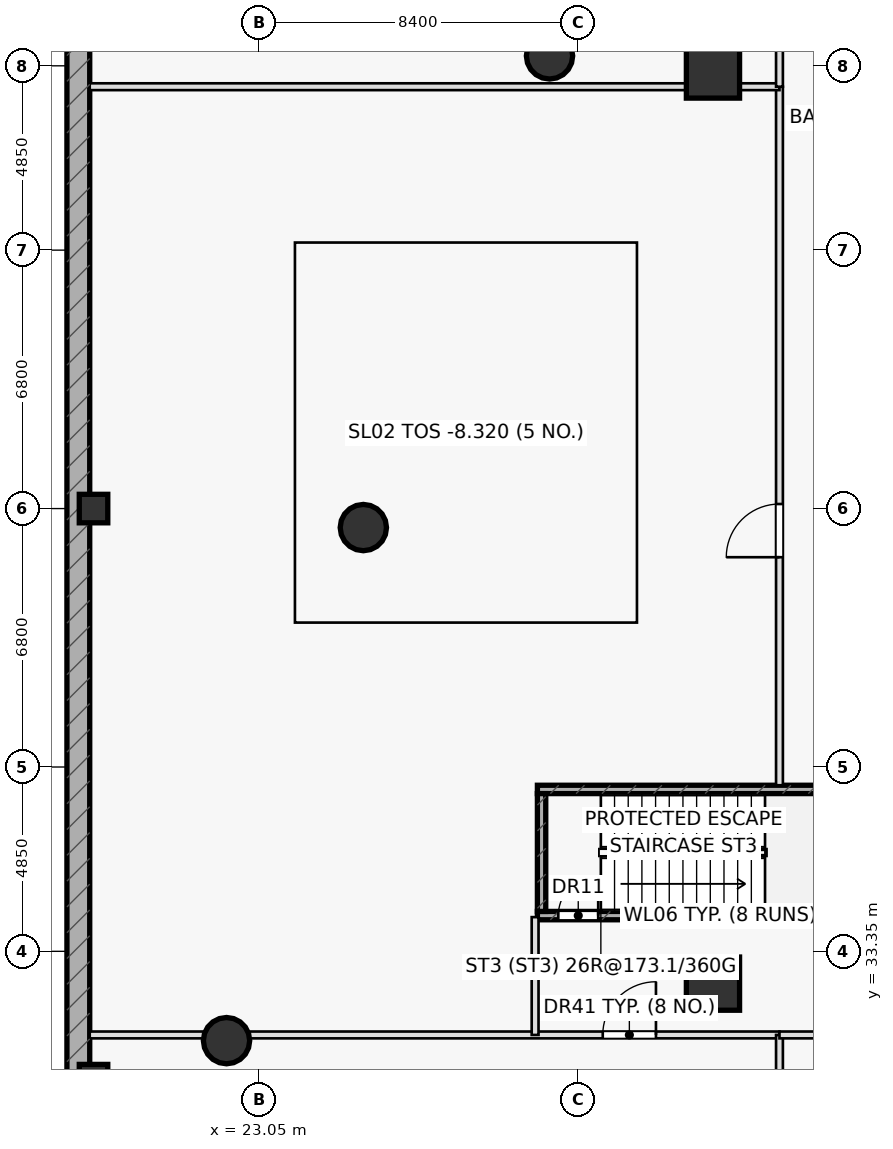
"""IFC4 building model, lengths in metres.
Left out: names, types, materials, properties, quantities, classifications, styles, units other than length and angle.
Written with IfcOpenShell. Run it as: python <this file> out.ifc"""

import sys

from ifc_helpers import new_model, si_unit, direction, frame, frame_2d, origin, origin_2d, place, context, subcontext, project, spatial, rectangle, hollow_circle, extrude, element, fill, save


model = new_model("IFC4")
c1 = context("Model", 3, precision=1e-05, world=origin(), true_north=direction((0.0, 1.0)))
c2 = subcontext(c1, "Body", "Model", "MODEL_VIEW")
j1 = project(units=[si_unit("LENGTHUNIT", "METRE"), si_unit("PLANEANGLEUNIT", "RADIAN")], contexts=[c1])
p1 = place(None, origin())
s1 = spatial("IfcSite", under=j1, at=p1, CompositionType="ELEMENT")
p2 = place(p1, origin())
s2 = spatial("IfcBuilding", under=s1, at=p2, CompositionType="ELEMENT")
p3 = place(p2, frame((0.0, 0.0, -8.7)))
s3 = spatial("IfcBuildingStorey", under=s2, at=p3, CompositionType="ELEMENT", Elevation=-8.7)
p4 = place(p3, frame((30.38, 34.29, 0.0), z_axis=(0.0, 0.0, 1.0), x_axis=(1.0, 0.0, 0.0)))
e1 = element("IfcWall", 1, at=p4, inside=s3, PredefinedType="SHEAR", context=c2, shape_type="SweptSolid", body=[
    extrude(rectangle(XDim=7.69, YDim=0.22, at=frame_2d((3.845, 0.0))), origin(), (0.0, 0.0, 1.0), 4.15),
])
p5 = place(p4, frame((0.55, 0.0, 0.0)))
e2 = element("IfcOpeningElement", 2, at=p5, cuts=e1, PredefinedType="OPENING", context=c2, shape_type="SweptSolid", body=[
    extrude(rectangle(XDim=1.05, YDim=2.2, at=frame_2d((0.525, 1.1))), frame((0.0, 0.12, 0.0), z_axis=(0.0, -1.0, 0.0), x_axis=(1.0, 0.0, 0.0)), (0.0, 0.0, 1.0), 0.24),
])
p6 = place(p3, frame((30.38, 37.61, 0.0), z_axis=(0.0, 0.0, 1.0), x_axis=(1.0, 0.0, 0.0)))
e3 = element("IfcWall", 3, at=p6, inside=s3, PredefinedType="SHEAR", context=c2, shape_type="SweptSolid", body=[
    extrude(rectangle(XDim=7.69, YDim=0.22, at=frame_2d((3.845, 0.0))), origin(), (0.0, 0.0, 1.0), 4.15),
])
p7 = place(p3, frame((30.49, 34.4, 0.0), z_axis=(0.0, 0.0, 1.0), x_axis=(0.0, 1.0, 0.0)))
e4 = element("IfcWall", 4, at=p7, inside=s3, PredefinedType="SHEAR", context=c2, shape_type="SweptSolid", body=[
    extrude(rectangle(XDim=3.1, YDim=0.22, at=frame_2d((1.55, 0.0))), origin(), (0.0, 0.0, 1.0), 4.15),
])
p8 = place(p3, frame((18.3, 16.6, 0.0), z_axis=(0.0, 0.0, 1.0), x_axis=(0.0, 1.0, 0.0)))
e5 = element("IfcWall", 5, at=p8, inside=s3, PredefinedType="USERDEFINED", context=c2, shape_type="SweptSolid", body=[
    extrude(rectangle(XDim=56.8, YDim=0.6, at=frame_2d((28.4, 0.0))), origin(), (0.0, 0.0, 1.0), 4.15),
])
for number, where, z_axis, x_axis in (
    (6, (18.7, 30.0, 0.0), (0.0, 0.0, 1.0), (1.0, 0.0, 0.0)),
    (7, (18.7, 45.0, 0.0), (0.0, 0.0, 1.0), (1.0, 0.0, 0.0)),
):
    element("IfcColumn", number, at=place(p3, frame(where, z_axis=z_axis, x_axis=x_axis)), inside=s3, PredefinedType="PILASTER", context=c2, shape_type="SweptSolid", body=[
        extrude(rectangle(XDim=0.75, YDim=0.75, at=origin_2d()), origin(), (0.0, 0.0, 1.0), 4.15),
    ])
for number, where, z_axis, x_axis in (
    (8, (35.0, 32.5, 0.0), (0.0, 0.0, 1.0), (1.0, 0.0, 0.0)),
    (9, (35.0, 56.5, 0.0), (0.0, 0.0, 1.0), (1.0, 0.0, 0.0)),
):
    element("IfcColumn", number, at=place(p3, frame(where, z_axis=z_axis, x_axis=x_axis)), inside=s3, PredefinedType="COLUMN", context=c2, shape_type="SweptSolid", body=[
        extrude(rectangle(XDim=1.4, YDim=1.4, at=origin_2d()), origin(), (0.0, 0.0, 1.0), 4.15),
    ])
for number, where, z_axis, x_axis in (
    (10, (30.699, 56.911, 0.0), (0.0, 0.0, 1.0), (1.0, 0.0, 0.0)),
    (11, (25.8, 44.5, 0.0), (0.0, 0.0, 1.0), (1.0, 0.0, 0.0)),
    (12, (22.2, 31.0, 0.0), (0.0, 0.0, 1.0), (1.0, 0.0, 0.0)),
):
    element("IfcColumn", number, at=place(p3, frame(where, z_axis=z_axis, x_axis=x_axis)), inside=s3, PredefinedType="COLUMN", context=c2, shape_type="SweptSolid", body=[
        extrude(hollow_circle(Radius=0.61, WallThickness=0.05, at=origin_2d()), origin(), (0.0, 0.0, 1.0), 4.15),
    ])
p9 = place(p3, frame((18.6, 31.15, 0.0), z_axis=(0.0, 0.0, 1.0), x_axis=(1.0, 0.0, 0.0)))
e13 = element("IfcWall", 13, at=p9, inside=s3, PredefinedType="PARTITIONING", context=c2, shape_type="SweptSolid", body=[
    extrude(rectangle(XDim=18.15, YDim=0.18, at=frame_2d((9.075, 0.0))), origin(), (0.0, 0.0, 1.0), 3.275),
])
p10 = place(p9, frame((13.5, 0.0, 0.0)))
e14 = element("IfcOpeningElement", 14, at=p10, cuts=e13, PredefinedType="OPENING", context=c2, shape_type="SweptSolid", body=[
    extrude(rectangle(XDim=1.4, YDim=2.15, at=frame_2d((0.7, 1.075))), frame((0.0, 0.1, 0.0), z_axis=(0.0, -1.0, 0.0), x_axis=(1.0, 0.0, 0.0)), (0.0, 0.0, 1.0), 0.2),
])
p11 = place(p3, frame((36.75, 16.6, 0.0), z_axis=(0.0, 0.0, 1.0), x_axis=(0.0, 1.0, 0.0)))
e15 = element("IfcWall", 15, at=p11, inside=s3, PredefinedType="PARTITIONING", context=c2, shape_type="SweptSolid", body=[
    extrude(rectangle(XDim=14.55, YDim=0.18, at=frame_2d((7.275, 0.0))), origin(), (0.0, 0.0, 1.0), 3.175),
])
p12 = place(p3, frame((30.32, 31.15, 0.0), z_axis=(0.0, 0.0, 1.0), x_axis=(0.0, 1.0, 0.0)))
e16 = element("IfcWall", 16, at=p12, inside=s3, PredefinedType="PARTITIONING", context=c2, shape_type="SweptSolid", body=[
    extrude(rectangle(XDim=3.1, YDim=0.18, at=frame_2d((1.55, 0.0))), origin(), (0.0, 0.0, 1.0), 3.275),
])
p13 = place(p3, frame((36.75, 37.72, 0.0), z_axis=(0.0, 0.0, 1.0), x_axis=(0.0, 1.0, 0.0)))
e17 = element("IfcWall", 17, at=p13, inside=s3, PredefinedType="PARTITIONING", context=c2, shape_type="SweptSolid", body=[
    extrude(rectangle(XDim=18.38, YDim=0.18, at=frame_2d((9.19, 0.0))), origin(), (0.0, 0.0, 1.0), 3.175),
])
p14 = place(p13, frame((6.0, 0.0, 0.0)))
e18 = element("IfcOpeningElement", 18, at=p14, cuts=e17, PredefinedType="OPENING", context=c2, shape_type="SweptSolid", body=[
    extrude(rectangle(XDim=1.4, YDim=2.15, at=frame_2d((0.7, 1.075))), frame((0.0, 0.1, 0.0), z_axis=(0.0, -1.0, 0.0), x_axis=(1.0, 0.0, 0.0)), (0.0, 0.0, 1.0), 0.2),
])
p15 = place(p3, frame((18.6, 56.1, 0.0), z_axis=(0.0, 0.0, 1.0), x_axis=(1.0, 0.0, 0.0)))
e19 = element("IfcWall", 19, at=p15, inside=s3, PredefinedType="PARTITIONING", context=c2, shape_type="SweptSolid", body=[
    extrude(rectangle(XDim=18.15, YDim=0.18, at=frame_2d((9.075, 0.0))), origin(), (0.0, 0.0, 1.0), 3.175),
])
p16 = place(p3, frame((36.75, 56.1, 0.0), z_axis=(0.0, 0.0, 1.0), x_axis=(0.0, 1.0, 0.0)))
e20 = element("IfcWall", 20, at=p16, inside=s3, PredefinedType="PARTITIONING", context=c2, shape_type="SweptSolid", body=[
    extrude(rectangle(XDim=17.3, YDim=0.18, at=frame_2d((8.65, 0.0))), origin(), (0.0, 0.0, 1.0), 3.175),
])
p17 = place(p16, frame((1.25, 0.0, 0.0)))
e21 = element("IfcOpeningElement", 21, at=p17, cuts=e20, PredefinedType="OPENING", context=c2, shape_type="SweptSolid", body=[
    extrude(rectangle(XDim=1.4, YDim=2.15, at=frame_2d((0.7, 1.075))), frame((0.0, 0.1, 0.0), z_axis=(0.0, -1.0, 0.0), x_axis=(1.0, 0.0, 0.0)), (0.0, 0.0, 1.0), 0.2),
])
p18 = place(p3, frame((36.75, 31.15, 0.0), z_axis=(0.0, 0.0, 1.0), x_axis=(1.0, 0.0, 0.0)))
e22 = element("IfcWall", 22, at=p18, inside=s3, PredefinedType="PARTITIONING", context=c2, shape_type="SweptSolid", body=[
    extrude(rectangle(XDim=23.5, YDim=0.18, at=frame_2d((11.75, 0.0))), origin(), (0.0, 0.0, 1.0), 3.275),
])
p19 = place(p18, frame((8.0, 0.0, 0.0)))
e23 = element("IfcOpeningElement", 23, at=p19, cuts=e22, PredefinedType="OPENING", context=c2, shape_type="SweptSolid", body=[
    extrude(rectangle(XDim=1.4, YDim=2.15, at=frame_2d((0.7, 1.075))), frame((0.0, 0.1, 0.0), z_axis=(0.0, -1.0, 0.0), x_axis=(1.0, 0.0, 0.0)), (0.0, 0.0, 1.0), 0.2),
])
p20 = place(p5, origin())
e24 = element("IfcDoor", 24, at=p20, inside=s3, OperationType="SINGLE_SWING_RIGHT", PredefinedType="DOOR", context=c2, shape_type="SweptSolid", body=[
    extrude(rectangle(XDim=1.05, YDim=2.2, at=frame_2d((0.525, 1.1))), frame((0.0, 0.025, 0.0), z_axis=(0.0, -1.0, 0.0), x_axis=(1.0, 0.0, 0.0)), (0.0, 0.0, 1.0), 0.05),
])
fill(e2, e24)
p21 = place(p10, origin())
e25 = element("IfcDoor", 25, at=p21, inside=s3, OperationType="SINGLE_SWING_RIGHT", PredefinedType="DOOR", context=c2, shape_type="SweptSolid", body=[
    extrude(rectangle(XDim=1.4, YDim=2.15, at=frame_2d((0.7, 1.075))), frame((0.0, 0.025, 0.0), z_axis=(0.0, -1.0, 0.0), x_axis=(1.0, 0.0, 0.0)), (0.0, 0.0, 1.0), 0.05),
])
fill(e14, e25)
p22 = place(p14, origin())
e26 = element("IfcDoor", 26, at=p22, inside=s3, OperationType="SINGLE_SWING_LEFT", PredefinedType="DOOR", context=c2, shape_type="SweptSolid", body=[
    extrude(rectangle(XDim=1.4, YDim=2.15, at=frame_2d((0.7, 1.075))), frame((0.0, 0.025, 0.0), z_axis=(0.0, -1.0, 0.0), x_axis=(1.0, 0.0, 0.0)), (0.0, 0.0, 1.0), 0.05),
])
fill(e18, e26)
save(model, sys.argv[1])
